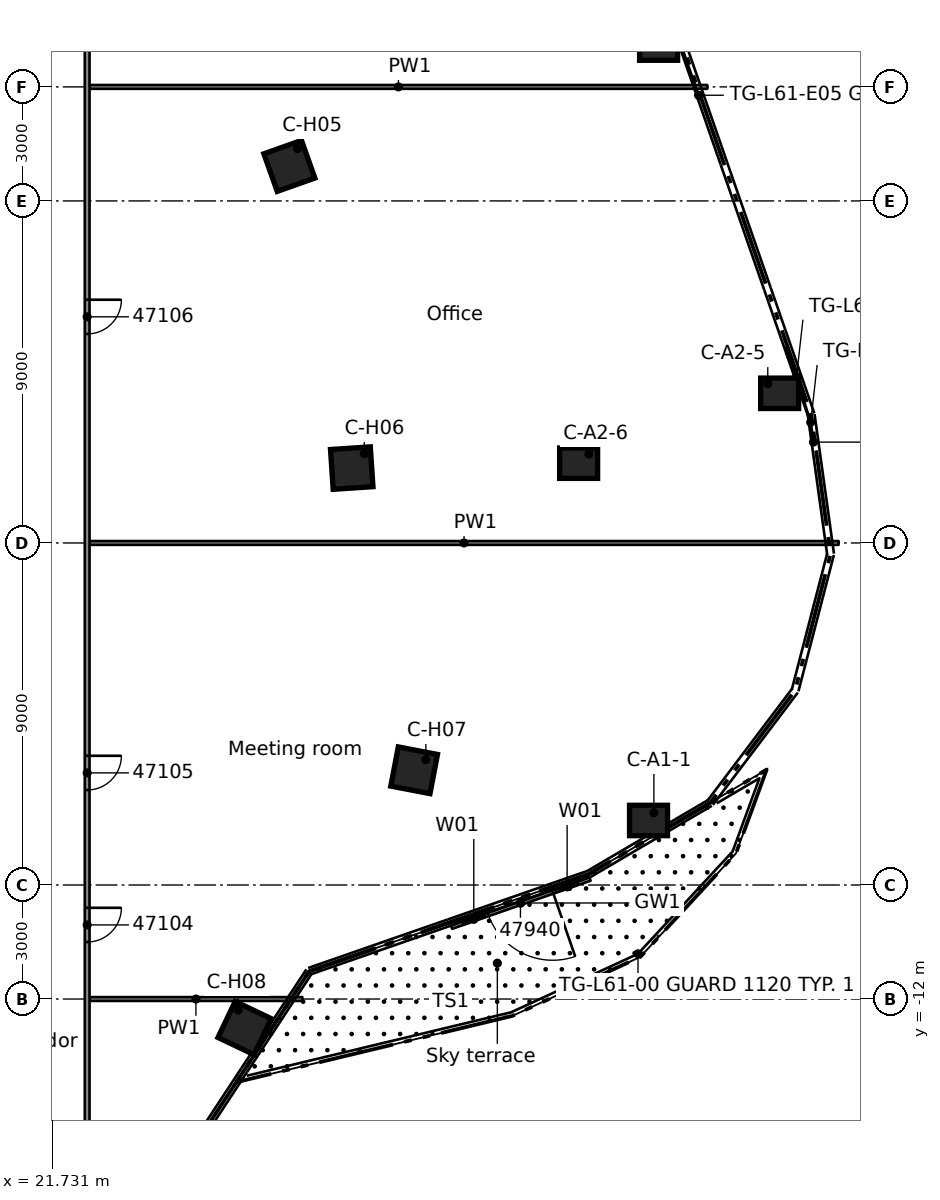
"""IFC4 building model, lengths in metres.
Left out: names, types, materials, properties, quantities, classifications, styles, units other than length and angle.
Written with IfcOpenShell. Run it as: python <this file> out.ifc"""

import sys

from ifc_helpers import new_model, si_unit, direction, frame, frame_2d, origin, origin_2d, place, context, subcontext, project, spatial, rectangle, extrude, element, fill, save


model = new_model("IFC4")
c1 = context("Model", 3, precision=1e-05, world=origin(), true_north=direction((0.0, 1.0)))
c2 = subcontext(c1, "Body", "Model", "MODEL_VIEW")
j1 = project(units=[si_unit("LENGTHUNIT", "METRE"), si_unit("PLANEANGLEUNIT", "RADIAN")], contexts=[c1])
p1 = place(None, origin())
s1 = spatial("IfcSite", under=j1, at=p1, CompositionType="ELEMENT")
p2 = place(p1, origin())
s2 = spatial("IfcBuilding", under=s1, at=p2, CompositionType="ELEMENT")
p3 = place(p2, frame((0.0, 0.0, 232.0)))
s3 = spatial("IfcBuildingStorey", under=s2, at=p3, CompositionType="ELEMENT", Elevation=232.0)
for number, where, z_axis, x_axis in (
    (1, (37.423, -7.302, 0.0), (0.0, 0.0, 1.0), (1.0, 0.0, 0.0)),
    (2, (40.873, 3.938, 0.0), (0.0, 0.0, 1.0), (1.0, 0.0, 0.0)),
    (3, (35.583, 2.099, 0.0), (0.0, 0.0, 1.0), (1.0, 0.0, 0.0)),
    (4, (37.688, 13.1, 0.0), (0.0, 0.0, 1.0), (1.0, 0.0, 0.0)),
):
    element("IfcColumn", number, at=place(p3, frame(where, z_axis=z_axis, x_axis=x_axis)), inside=s3, PredefinedType="COLUMN", context=c2, shape_type="SweptSolid", body=[
        extrude(rectangle(XDim=1.0, YDim=0.8, at=origin_2d()), origin(), (0.0, 0.0, 1.0), 3.5),
    ])
for number, where, z_axis, x_axis in (
    (5, (27.972, 9.921, 0.0), (0.0, 0.0, 1.0), (0.942, 0.334, 0.0)),
    (6, (29.613, 1.97, 0.0), (0.0, 0.0, 1.0), (0.998, 0.066, 0.0)),
    (7, (31.255, -5.981, 0.0), (0.0, 0.0, 1.0), (0.982, -0.188, 0.0)),
    (8, (26.794, -12.764, 0.0), (0.0, 0.0, 1.0), (0.903, -0.43, 0.0)),
):
    element("IfcColumn", number, at=place(p3, frame(where, z_axis=z_axis, x_axis=x_axis)), inside=s3, PredefinedType="COLUMN", context=c2, shape_type="SweptSolid", body=[
        extrude(rectangle(XDim=1.05, YDim=1.05, at=origin_2d()), origin(), (0.0, 0.0, 1.0), 3.5),
    ])
p4 = place(p3, frame((35.882, -8.84, 0.0), z_axis=(0.0, 0.0, 1.0), x_axis=(-0.944601748035, -0.328218734396, 0.0)))
e9 = element("IfcWall", 9, at=p4, inside=s3, PredefinedType="STANDARD", context=c2, shape_type="SweptSolid", body=[
    extrude(rectangle(XDim=3.858, YDim=0.1, at=frame_2d((1.929, 0.0))), origin(), (0.0, 0.0, 1.0), 3.1),
])
p5 = place(p4, frame((1.037, 0.0, 0.0)))
e10 = element("IfcOpeningElement", 10, at=p5, cuts=e9, PredefinedType="OPENING", context=c2, shape_type="SweptSolid", body=[
    extrude(rectangle(XDim=1.8, YDim=2.4, at=frame_2d((0.9, 1.2))), frame((0.0, 0.06, 0.0), z_axis=(0.0, -1.0, 0.0), x_axis=(1.0, 0.0, 0.0)), (0.0, 0.0, 1.0), 0.12),
])
p6 = place(p4, frame((0.337, 0.0, 0.0)))
e11 = element("IfcOpeningElement", 11, at=p6, cuts=e9, PredefinedType="OPENING", context=c2, shape_type="SweptSolid", body=[
    extrude(rectangle(XDim=0.6, YDim=2.4, at=frame_2d((0.3, 1.2))), frame((0.0, 0.06, 0.0), z_axis=(0.0, -1.0, 0.0), x_axis=(1.0, 0.0, 0.0)), (0.0, 0.0, 1.0), 0.12),
])
p7 = place(p4, frame((2.937, 0.0, 0.0)))
e12 = element("IfcOpeningElement", 12, at=p7, cuts=e9, PredefinedType="OPENING", context=c2, shape_type="SweptSolid", body=[
    extrude(rectangle(XDim=0.6, YDim=2.4, at=frame_2d((0.3, 1.2))), frame((0.0, 0.06, 0.0), z_axis=(0.0, -1.0, 0.0), x_axis=(1.0, 0.0, 0.0)), (0.0, 0.0, 1.0), 0.12),
])
p8 = place(p3, frame((22.713, -12.0, 0.0), z_axis=(0.0, 0.0, 1.0), x_axis=(1.0, 0.0, 0.0)))
e13 = element("IfcWall", 13, at=p8, inside=s3, PredefinedType="PARTITIONING", context=c2, shape_type="SweptSolid", body=[
    extrude(rectangle(XDim=5.6, YDim=0.1, at=frame_2d((2.8, 0.0))), origin(), (0.0, 0.0, 1.0), 3.08),
])
p9 = place(p3, frame((22.713, 0.0, 0.0), z_axis=(0.0, 0.0, 1.0), x_axis=(1.0, 0.0, 0.0)))
e14 = element("IfcWall", 14, at=p9, inside=s3, PredefinedType="PARTITIONING", context=c2, shape_type="SweptSolid", body=[
    extrude(rectangle(XDim=19.711, YDim=0.1, at=frame_2d((9.855, 0.0))), origin(), (0.0, 0.0, 1.0), 3.08),
])
p10 = place(p3, frame((22.713, 12.0, 0.0), z_axis=(0.0, 0.0, 1.0), x_axis=(1.0, 0.0, 0.0)))
e15 = element("IfcWall", 15, at=p10, inside=s3, PredefinedType="PARTITIONING", context=c2, shape_type="SweptSolid", body=[
    extrude(rectangle(XDim=16.257, YDim=0.1, at=frame_2d((8.128, 0.0))), origin(), (0.0, 0.0, 1.0), 3.08),
])
p11 = place(p3, frame((22.651, 15.65, 0.0), z_axis=(0.0, 0.0, 1.0), x_axis=(0.0, -1.0, 0.0)))
e16 = element("IfcWall", 16, at=p11, inside=s3, PredefinedType="PARTITIONING", context=c2, shape_type="SweptSolid", body=[
    extrude(rectangle(XDim=31.3, YDim=0.125, at=frame_2d((15.65, 0.0))), origin(), (0.0, 0.0, 1.0), 3.08),
])
p12 = place(p11, frame((25.25, 0.0, 0.0)))
e17 = element("IfcOpeningElement", 17, at=p12, cuts=e16, PredefinedType="OPENING", context=c2, shape_type="SweptSolid", body=[
    extrude(rectangle(XDim=0.9, YDim=2.1, at=frame_2d((0.45, 1.05))), frame((0.0, 0.073, 0.0), z_axis=(0.0, -1.0, 0.0), x_axis=(1.0, 0.0, 0.0)), (0.0, 0.0, 1.0), 0.145),
])
p13 = place(p11, frame((21.25, 0.0, 0.0)))
e18 = element("IfcOpeningElement", 18, at=p13, cuts=e16, PredefinedType="OPENING", context=c2, shape_type="SweptSolid", body=[
    extrude(rectangle(XDim=0.9, YDim=2.1, at=frame_2d((0.45, 1.05))), frame((0.0, 0.073, 0.0), z_axis=(0.0, -1.0, 0.0), x_axis=(1.0, 0.0, 0.0)), (0.0, 0.0, 1.0), 0.145),
])
p14 = place(p11, frame((9.25, 0.0, 0.0)))
e19 = element("IfcOpeningElement", 19, at=p14, cuts=e16, PredefinedType="OPENING", context=c2, shape_type="SweptSolid", body=[
    extrude(rectangle(XDim=0.9, YDim=2.1, at=frame_2d((0.45, 1.05))), frame((0.0, 0.073, 0.0), z_axis=(0.0, -1.0, 0.0), x_axis=(1.0, 0.0, 0.0)), (0.0, 0.0, 1.0), 0.145),
])
p15 = place(p11, frame((0.85, 0.0, 0.0)))
e20 = element("IfcOpeningElement", 20, at=p15, cuts=e16, PredefinedType="OPENING", context=c2, shape_type="SweptSolid", body=[
    extrude(rectangle(XDim=1.8, YDim=2.1, at=frame_2d((0.9, 1.05))), frame((0.0, 0.073, 0.0), z_axis=(0.0, -1.0, 0.0), x_axis=(1.0, 0.0, 0.0)), (0.0, 0.0, 1.0), 0.145),
])
p16 = place(p5, origin())
e21 = element("IfcDoor", 21, at=p16, inside=s3, OperationType="DOUBLE_DOOR_SINGLE_SWING", PredefinedType="DOOR", context=c2, shape_type="SweptSolid", body=[
    extrude(rectangle(XDim=1.8, YDim=2.4, at=frame_2d((0.9, 1.2))), frame((0.0, 0.025, 0.0), z_axis=(0.0, -1.0, 0.0), x_axis=(1.0, 0.0, 0.0)), (0.0, 0.0, 1.0), 0.05),
])
fill(e10, e21)
p17 = place(p6, origin())
e22 = element("IfcWindow", 22, at=p17, inside=s3, PartitioningType="SINGLE_PANEL", PredefinedType="WINDOW", context=c2, shape_type="SweptSolid", body=[
    extrude(rectangle(XDim=0.6, YDim=2.4, at=frame_2d((0.3, 1.2))), frame((0.0, 0.03, 0.0), z_axis=(0.0, -1.0, 0.0), x_axis=(1.0, 0.0, 0.0)), (0.0, 0.0, 1.0), 0.06),
])
fill(e11, e22)
p18 = place(p7, origin())
e23 = element("IfcWindow", 23, at=p18, inside=s3, PartitioningType="SINGLE_PANEL", PredefinedType="WINDOW", context=c2, shape_type="SweptSolid", body=[
    extrude(rectangle(XDim=0.6, YDim=2.4, at=frame_2d((0.3, 1.2))), frame((0.0, 0.03, 0.0), z_axis=(0.0, -1.0, 0.0), x_axis=(1.0, 0.0, 0.0)), (0.0, 0.0, 1.0), 0.06),
])
fill(e12, e23)
p19 = place(p12, origin())
e24 = element("IfcDoor", 24, at=p19, inside=s3, OperationType="SINGLE_SWING_RIGHT", PredefinedType="DOOR", context=c2, shape_type="SweptSolid", body=[
    extrude(rectangle(XDim=0.9, YDim=2.1, at=frame_2d((0.45, 1.05))), frame((0.0, 0.025, 0.0), z_axis=(0.0, -1.0, 0.0), x_axis=(1.0, 0.0, 0.0)), (0.0, 0.0, 1.0), 0.05),
])
fill(e17, e24)
p20 = place(p13, origin())
e25 = element("IfcDoor", 25, at=p20, inside=s3, OperationType="SINGLE_SWING_RIGHT", PredefinedType="DOOR", context=c2, shape_type="SweptSolid", body=[
    extrude(rectangle(XDim=0.9, YDim=2.1, at=frame_2d((0.45, 1.05))), frame((0.0, 0.025, 0.0), z_axis=(0.0, -1.0, 0.0), x_axis=(1.0, 0.0, 0.0)), (0.0, 0.0, 1.0), 0.05),
])
fill(e18, e25)
p21 = place(p14, origin())
e26 = element("IfcDoor", 26, at=p21, inside=s3, OperationType="SINGLE_SWING_LEFT", PredefinedType="DOOR", context=c2, shape_type="SweptSolid", body=[
    extrude(rectangle(XDim=0.9, YDim=2.1, at=frame_2d((0.45, 1.05))), frame((0.0, 0.025, 0.0), z_axis=(0.0, -1.0, 0.0), x_axis=(1.0, 0.0, 0.0)), (0.0, 0.0, 1.0), 0.05),
])
fill(e19, e26)
save(model, sys.argv[1])
